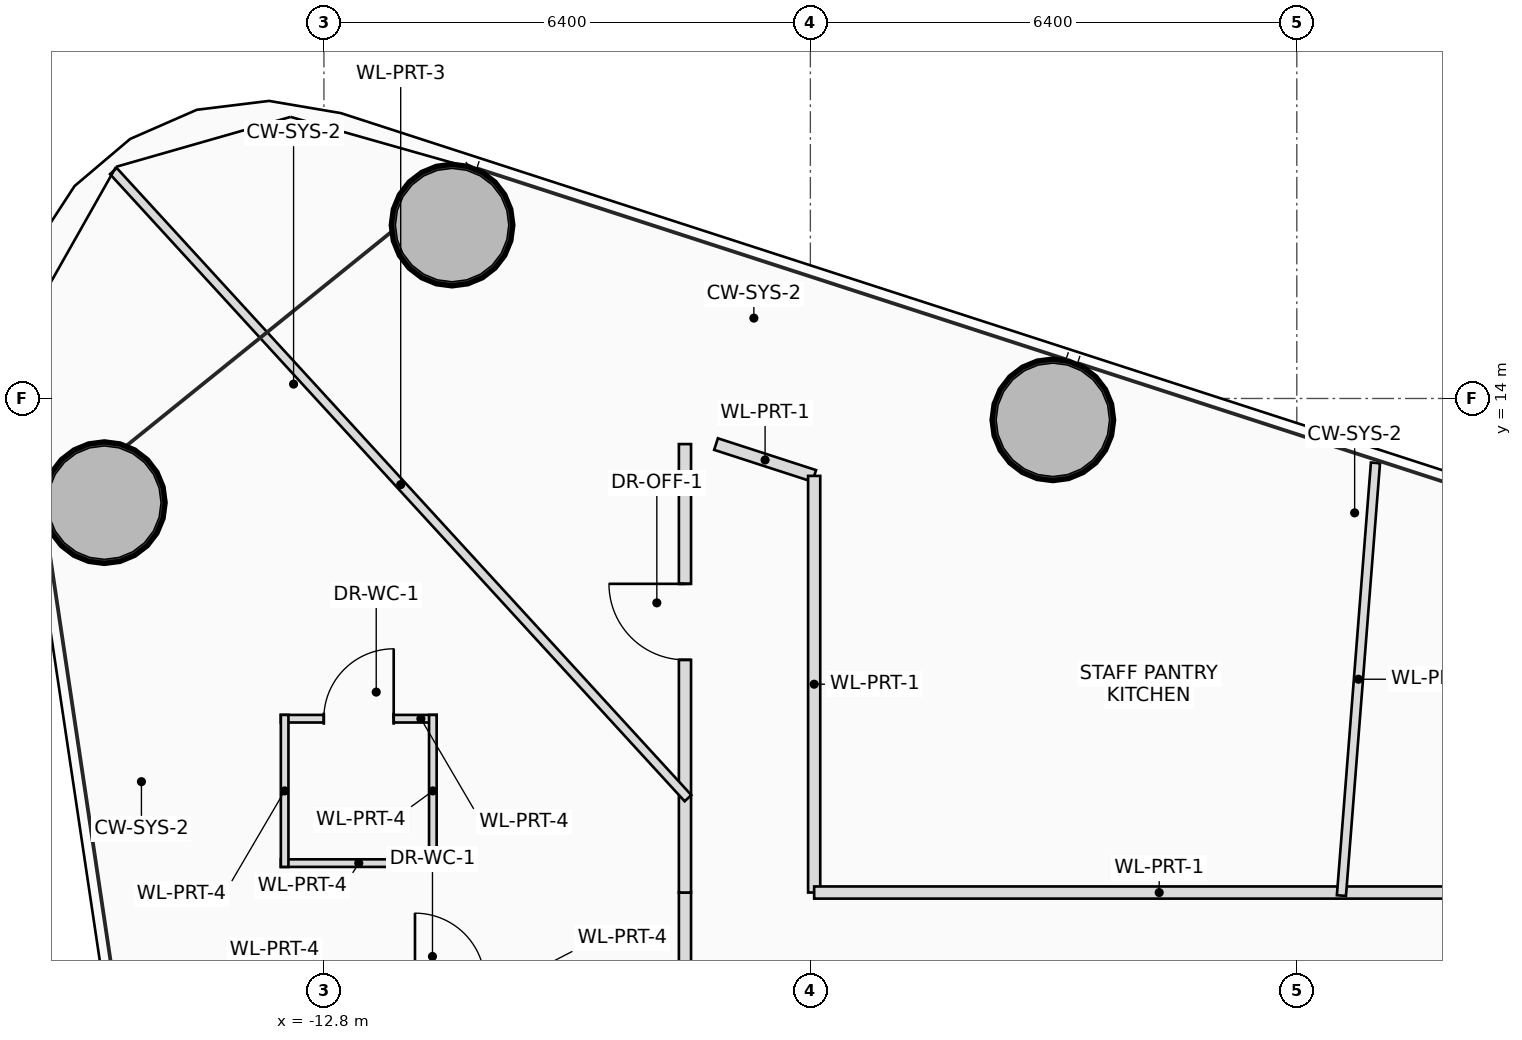
"""IFC4 building model, lengths in metres.
Left out: names, types, materials, properties, quantities, classifications, styles, units other than length and angle.
Written with IfcOpenShell. Run it as: python <this file> out.ifc"""

import sys

from ifc_helpers import new_model, si_unit, direction, frame, frame_2d, origin, origin_2d, place, context, subcontext, project, spatial, rectangle, hollow_circle, extrude, source, transform, mapped, element, fill, save


model = new_model("IFC4")
c1 = context("Model", 3, precision=1e-05, world=origin(), true_north=direction((0.0, 1.0)))
c2 = subcontext(c1, "Body", "Model", "MODEL_VIEW")
j1 = project(units=[si_unit("LENGTHUNIT", "METRE"), si_unit("PLANEANGLEUNIT", "RADIAN")], contexts=[c1])
p1 = place(None, origin())
s1 = spatial("IfcSite", under=j1, at=p1, CompositionType="ELEMENT")
p2 = place(p1, origin())
s2 = spatial("IfcBuilding", under=s1, at=p2, CompositionType="ELEMENT")
p3 = place(p2, frame((0.0, 0.0, 54.8)))
s3 = spatial("IfcBuildingStorey", under=s2, at=p3, CompositionType="ELEMENT", Elevation=54.8)
m1 = source(origin(), c2, "Body", "SweptSolid", [
    extrude(hollow_circle(Radius=0.8, WallThickness=0.055, at=origin_2d()), origin(), (0.0, 0.0, 1.0), 3.75),
])
for number, where, z_axis, x_axis in (
    (1, (-3.21, 13.719, 0.0), (0.0, 0.0, 1.0), (1.0, 0.0, 0.0)),
    (2, (-11.114, 16.281, 0.0), (0.0, 0.0, 1.0), (1.0, 0.0, 0.0)),
    (3, (-15.689, 12.629, 0.0), (0.0, 0.0, 1.0), (1.0, 0.0, 0.0)),
):
    element("IfcColumn", number, at=place(p3, frame(where, z_axis=z_axis, x_axis=x_axis)), inside=s3, PredefinedType="COLUMN", context=c2, shape_type="MappedRepresentation", body=[
        mapped(m1, transform((0.0, 0.0, 0.0), scale=1.0)),
    ])
p4 = place(p3, frame((-13.367, 9.787, 0.0), z_axis=(0.0, 0.0, 1.0), x_axis=(1.0, 0.0, 0.0)))
e4 = element("IfcWall", 4, at=p4, inside=s3, PredefinedType="PARTITIONING", context=c2, shape_type="SweptSolid", body=[
    extrude(rectangle(XDim=2.05, YDim=0.1, at=frame_2d((1.025, 0.0))), origin(), (0.0, 0.0, 1.0), 2.85),
])
p5 = place(p4, frame((0.565, 0.0, 0.0)))
e5 = element("IfcOpeningElement", 5, at=p5, cuts=e4, PredefinedType="OPENING", context=c2, shape_type="SweptSolid", body=[
    extrude(rectangle(XDim=0.92, YDim=2.1, at=frame_2d((0.46, 1.05))), frame((0.0, 0.06, 0.0), z_axis=(0.0, -1.0, 0.0), x_axis=(1.0, 0.0, 0.0)), (0.0, 0.0, 1.0), 0.12),
])
p6 = place(p3, frame((-11.317, 7.887, 0.0), z_axis=(0.0, 0.0, 1.0), x_axis=(-1.0, 0.0, 0.0)))
e6 = element("IfcWall", 6, at=p6, inside=s3, PredefinedType="PARTITIONING", context=c2, shape_type="SweptSolid", body=[
    extrude(rectangle(XDim=2.05, YDim=0.1, at=frame_2d((1.025, 0.0))), origin(), (0.0, 0.0, 1.0), 3.2),
])
p7 = place(p3, frame((-11.367, 9.837, 0.0), z_axis=(0.0, 0.0, 1.0), x_axis=(0.0, -1.0, 0.0)))
e7 = element("IfcWall", 7, at=p7, inside=s3, PredefinedType="PARTITIONING", context=c2, shape_type="SweptSolid", body=[
    extrude(rectangle(XDim=2.0, YDim=0.1, at=frame_2d((1.0, 0.0))), origin(), (0.0, 0.0, 1.0), 2.85),
])
p8 = place(p3, frame((-13.317, 7.837, 0.0), z_axis=(0.0, 0.0, 1.0), x_axis=(0.0, 1.0, 0.0)))
e8 = element("IfcWall", 8, at=p8, inside=s3, PredefinedType="PARTITIONING", context=c2, shape_type="SweptSolid", body=[
    extrude(rectangle(XDim=2.0, YDim=0.1, at=frame_2d((1.0, 0.0))), origin(), (0.0, 0.0, 1.0), 3.545),
])
p9 = place(p3, frame((-8.05, -7.5, 0.0), z_axis=(0.0, 0.0, 1.0), x_axis=(0.0, 1.0, 0.0)))
e9 = element("IfcWall", 9, at=p9, inside=s3, PredefinedType="PARTITIONING", context=c2, shape_type="SweptSolid", body=[
    extrude(rectangle(XDim=15.0, YDim=0.16, at=frame_2d((7.5, 0.0))), origin(), (0.0, 0.0, 1.0), 2.85),
])
p10 = place(p9, frame((8.806, 0.0, 0.0)))
e10 = element("IfcOpeningElement", 10, at=p10, cuts=e9, PredefinedType="OPENING", context=c2, shape_type="SweptSolid", body=[
    extrude(rectangle(XDim=1.0, YDim=2.25, at=frame_2d((0.5, 1.125))), frame((0.0, 0.09, 0.0), z_axis=(0.0, -1.0, 0.0), x_axis=(1.0, 0.0, 0.0)), (0.0, 0.0, 1.0), 0.18),
])
p11 = place(p3, frame((-8.05, 7.5, 0.0), z_axis=(0.0, 0.0, 1.0), x_axis=(0.0, 1.0, 0.0)))
e11 = element("IfcWall", 11, at=p11, inside=s3, PredefinedType="PARTITIONING", context=c2, shape_type="SweptSolid", body=[
    extrude(rectangle(XDim=5.9, YDim=0.16, at=frame_2d((2.95, 0.0))), origin(), (0.0, 0.0, 1.0), 2.85),
])
p12 = place(p11, frame((3.061, 0.0, 0.0)))
e12 = element("IfcOpeningElement", 12, at=p12, cuts=e11, PredefinedType="OPENING", context=c2, shape_type="SweptSolid", body=[
    extrude(rectangle(XDim=1.0, YDim=2.25, at=frame_2d((0.5, 1.125))), frame((0.0, 0.09, 0.0), z_axis=(0.0, -1.0, 0.0), x_axis=(1.0, 0.0, 0.0)), (0.0, 0.0, 1.0), 0.18),
])
p13 = place(p3, frame((-7.641, 13.4, 0.0), z_axis=(0.0, 0.0, 1.0), x_axis=(0.951277022007, -0.308337521884, 0.0)))
e13 = element("IfcWall", 13, at=p13, inside=s3, PredefinedType="PARTITIONING", context=c2, shape_type="SweptSolid", body=[
    extrude(rectangle(XDim=1.357, YDim=0.16, at=frame_2d((0.679, 0.0))), origin(), (0.0, 0.0, 1.0), 3.545),
])
p14 = place(p3, frame((-6.35, 12.981, 0.0), z_axis=(0.0, 0.0, 1.0), x_axis=(0.0, -1.0, 0.0)))
e14 = element("IfcWall", 14, at=p14, inside=s3, PredefinedType="PARTITIONING", context=c2, shape_type="SweptSolid", body=[
    extrude(rectangle(XDim=5.481, YDim=0.16, at=frame_2d((2.741, 0.0))), origin(), (0.0, 0.0, 1.0), 3.05),
])
p15 = place(p3, frame((-6.35, 7.5, 0.0), z_axis=(0.0, 0.0, 1.0), x_axis=(1.0, 0.0, 0.0)))
e15 = element("IfcWall", 15, at=p15, inside=s3, PredefinedType="PARTITIONING", context=c2, shape_type="SweptSolid", body=[
    extrude(rectangle(XDim=12.7, YDim=0.16, at=frame_2d((6.35, 0.0))), origin(), (0.0, 0.0, 1.0), 2.85),
])
p16 = place(p15, frame((9.229, 0.0, 0.0)))
e16 = element("IfcOpeningElement", 16, at=p16, cuts=e15, PredefinedType="OPENING", context=c2, shape_type="SweptSolid", body=[
    extrude(rectangle(XDim=1.0, YDim=2.25, at=frame_2d((0.5, 1.125))), frame((0.0, 0.09, 0.0), z_axis=(0.0, -1.0, 0.0), x_axis=(1.0, 0.0, 0.0)), (0.0, 0.0, 1.0), 0.18),
])
p17 = place(p3, frame((0.587, 7.46, 0.0), z_axis=(0.0, 0.0, 1.0), x_axis=(0.078455369282, 0.996917627004, 0.0)))
e17 = element("IfcWall", 17, at=p17, inside=s3, PredefinedType="PARTITIONING", context=c2, shape_type="SweptSolid", body=[
    extrude(rectangle(XDim=5.71, YDim=0.12, at=frame_2d((2.855, 0.0))), origin(), (0.0, 0.0, 1.0), 3.01),
])
p18 = place(p3, frame((-8.01, 8.741, 0.0), z_axis=(0.0, 0.0, 1.0), x_axis=(-0.675595196102, 0.737272765674, 0.0)))
e18 = element("IfcWall", 18, at=p18, inside=s3, PredefinedType="PARTITIONING", context=c2, shape_type="SweptSolid", body=[
    extrude(rectangle(XDim=11.19, YDim=0.12, at=frame_2d((5.595, 0.0))), origin(), (0.0, 0.0, 1.0), 3.01),
])
p19 = place(p5, origin())
e19 = element("IfcDoor", 19, at=p19, inside=s3, OperationType="SINGLE_SWING_RIGHT", PredefinedType="DOOR", context=c2, shape_type="SweptSolid", body=[
    extrude(rectangle(XDim=0.92, YDim=2.1, at=frame_2d((0.46, 1.05))), frame((0.0, 0.025, 0.0), z_axis=(0.0, -1.0, 0.0), x_axis=(1.0, 0.0, 0.0)), (0.0, 0.0, 1.0), 0.05),
])
fill(e5, e19)
p20 = place(p12, origin())
e20 = element("IfcDoor", 20, at=p20, inside=s3, OperationType="SINGLE_SWING_RIGHT", PredefinedType="DOOR", context=c2, shape_type="SweptSolid", body=[
    extrude(rectangle(XDim=1.0, YDim=2.25, at=frame_2d((0.5, 1.125))), frame((0.0, 0.025, 0.0), z_axis=(0.0, -1.0, 0.0), x_axis=(1.0, 0.0, 0.0)), (0.0, 0.0, 1.0), 0.05),
])
fill(e12, e20)
save(model, sys.argv[1])
